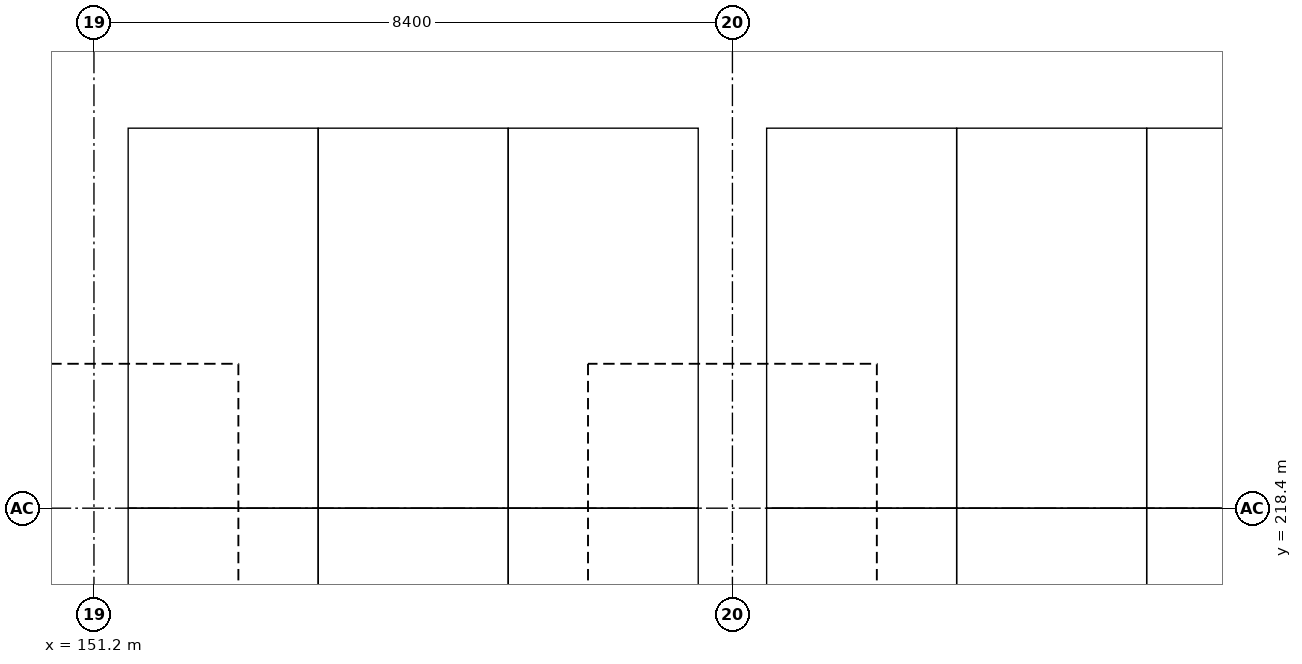
"""IFC4 building model, lengths in metres.
Left out: names, types, materials, properties, quantities, classifications, styles, units other than length and angle.
Written with IfcOpenShell. Run it as: python <this file> out.ifc"""

import sys

from ifc_helpers import new_model, si_unit, direction, frame, origin, origin_2d, place, context, subcontext, project, spatial, rectangle, extrude, element, save


model = new_model("IFC4")
c1 = context("Model", 3, precision=1e-05, world=origin(), true_north=direction((0.0, 1.0)))
c2 = subcontext(c1, "Body", "Model", "MODEL_VIEW")
j1 = project(units=[si_unit("LENGTHUNIT", "METRE"), si_unit("PLANEANGLEUNIT", "RADIAN")], contexts=[c1])
p1 = place(None, origin())
s1 = spatial("IfcSite", under=j1, at=p1, CompositionType="ELEMENT")
p2 = place(p1, origin())
s2 = spatial("IfcBuilding", under=s1, at=p2, CompositionType="ELEMENT")
p3 = place(p2, frame((0.0, 0.0, -3.0)))
s3 = spatial("IfcBuildingStorey", under=s2, at=p3, CompositionType="ELEMENT", Elevation=-3.0)
for number, where, z_axis, x_axis in (
    (1, (151.2, 218.4, 0.0), (0.0, 0.0, 1.0), (1.0, 0.0, 0.0)),
    (2, (159.6, 218.4, 0.0), (0.0, 0.0, 1.0), (1.0, 0.0, 0.0)),
):
    element("IfcColumn", number, at=place(p3, frame(where, z_axis=z_axis, x_axis=x_axis)), inside=s3, PredefinedType="COLUMN", context=c2, shape_type="SweptSolid", body=[
        extrude(rectangle(XDim=0.8, YDim=0.8, at=origin_2d()), origin(), (0.0, 0.0, 1.0), 2.4),
    ])
save(model, sys.argv[1])
